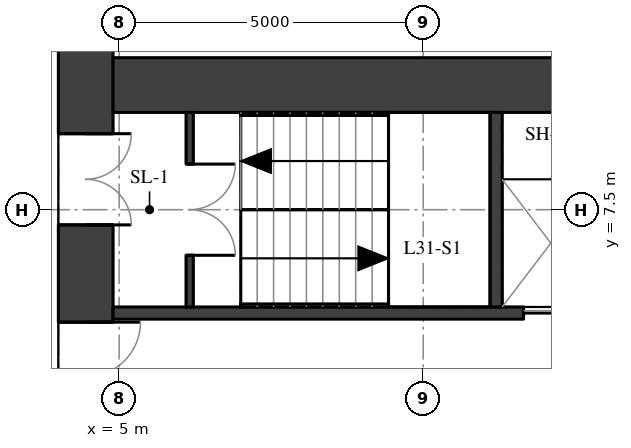
"""IFC4 building model, lengths in metres.
Left out: names, types, materials, properties, quantities, classifications, styles, units other than length and angle.
Written with IfcOpenShell. Run it as: python <this file> out.ifc"""

import sys

from ifc_helpers import new_model, si_unit, direction, frame, frame_2d, origin, place, context, subcontext, project, spatial, rectangle, extrude, element, fill, save


model = new_model("IFC4")
c1 = context("Model", 3, precision=1e-05, world=origin(), true_north=direction((0.0, 1.0)))
c2 = subcontext(c1, "Body", "Model", "MODEL_VIEW")
j1 = project(units=[si_unit("LENGTHUNIT", "METRE"), si_unit("PLANEANGLEUNIT", "RADIAN")], contexts=[c1])
p1 = place(None, origin())
s1 = spatial("IfcSite", under=j1, at=p1, CompositionType="ELEMENT")
p2 = place(p1, origin())
s2 = spatial("IfcBuilding", under=s1, at=p2, CompositionType="ELEMENT")
p3 = place(p2, frame((0.0, 0.0, 112.0)))
s3 = spatial("IfcBuildingStorey", under=s2, at=p3, CompositionType="ELEMENT", Elevation=112.0)
p4 = place(p3, frame((4.45, -11.1, 0.0), z_axis=(0.0, 0.0, 1.0), x_axis=(0.0, 1.0, 0.0)))
e1 = element("IfcWall", 1, at=p4, inside=s3, PredefinedType="SHEAR", context=c2, shape_type="SweptSolid", body=[
    extrude(rectangle(XDim=22.2, YDim=0.9, at=frame_2d((11.1, 0.0))), origin(), (0.0, 0.0, 1.0), 3.02),
])
p5 = place(p4, frame((2.35, 0.0, 0.0)))
e2 = element("IfcOpeningElement", 2, at=p5, cuts=e1, PredefinedType="OPENING", context=c2, shape_type="SweptSolid", body=[
    extrude(rectangle(XDim=1.5, YDim=2.1, at=frame_2d((0.75, 1.05))), frame((0.0, 0.46, 0.0), z_axis=(0.0, -1.0, 0.0), x_axis=(1.0, 0.0, 0.0)), (0.0, 0.0, 1.0), 0.92),
])
p6 = place(p4, frame((5.45, 0.0, 0.0)))
e3 = element("IfcOpeningElement", 3, at=p6, cuts=e1, PredefinedType="OPENING", context=c2, shape_type="SweptSolid", body=[
    extrude(rectangle(XDim=1.8, YDim=2.1, at=frame_2d((0.9, 1.05))), frame((0.0, 0.46, 0.0), z_axis=(0.0, -1.0, 0.0), x_axis=(1.0, 0.0, 0.0)), (0.0, 0.0, 1.0), 0.92),
])
p7 = place(p4, frame((7.95, 0.0, 0.0)))
e4 = element("IfcOpeningElement", 4, at=p7, cuts=e1, PredefinedType="OPENING", context=c2, shape_type="SweptSolid", body=[
    extrude(rectangle(XDim=1.1, YDim=2.1, at=frame_2d((0.55, 1.05))), frame((0.0, 0.46, 0.0), z_axis=(0.0, -1.0, 0.0), x_axis=(1.0, 0.0, 0.0)), (0.0, 0.0, 1.0), 0.92),
])
p8 = place(p4, frame((10.6, 0.0, 0.0)))
e5 = element("IfcOpeningElement", 5, at=p8, cuts=e1, PredefinedType="OPENING", context=c2, shape_type="SweptSolid", body=[
    extrude(rectangle(XDim=1.0, YDim=2.1, at=frame_2d((0.5, 1.05))), frame((0.0, 0.46, 0.0), z_axis=(0.0, -1.0, 0.0), x_axis=(1.0, 0.0, 0.0)), (0.0, 0.0, 1.0), 0.92),
])
p9 = place(p4, frame((13.15, 0.0, 0.0)))
e6 = element("IfcOpeningElement", 6, at=p9, cuts=e1, PredefinedType="OPENING", context=c2, shape_type="SweptSolid", body=[
    extrude(rectangle(XDim=1.1, YDim=2.1, at=frame_2d((0.55, 1.05))), frame((0.0, 0.46, 0.0), z_axis=(0.0, -1.0, 0.0), x_axis=(1.0, 0.0, 0.0)), (0.0, 0.0, 1.0), 0.92),
])
p10 = place(p4, frame((14.95, 0.0, 0.0)))
e7 = element("IfcOpeningElement", 7, at=p10, cuts=e1, PredefinedType="OPENING", context=c2, shape_type="SweptSolid", body=[
    extrude(rectangle(XDim=1.8, YDim=2.1, at=frame_2d((0.9, 1.05))), frame((0.0, 0.46, 0.0), z_axis=(0.0, -1.0, 0.0), x_axis=(1.0, 0.0, 0.0)), (0.0, 0.0, 1.0), 0.92),
])
p11 = place(p4, frame((18.35, 0.0, 0.0)))
e8 = element("IfcOpeningElement", 8, at=p11, cuts=e1, PredefinedType="OPENING", context=c2, shape_type="SweptSolid", body=[
    extrude(rectangle(XDim=1.5, YDim=2.1, at=frame_2d((0.75, 1.05))), frame((0.0, 0.46, 0.0), z_axis=(0.0, -1.0, 0.0), x_axis=(1.0, 0.0, 0.0)), (0.0, 0.0, 1.0), 0.92),
])
p12 = place(p3, frame((4.9, 9.55, 0.0), z_axis=(0.0, 0.0, 1.0), x_axis=(1.0, 0.0, 0.0)))
e9 = element("IfcWall", 9, at=p12, inside=s3, PredefinedType="SHEAR", context=c2, shape_type="SweptSolid", body=[
    extrude(rectangle(XDim=10.2, YDim=0.9, at=frame_2d((5.1, 0.0))), origin(), (0.0, 0.0, 1.0), 3.02),
])
p13 = place(p3, frame((4.9, 5.8, 0.0), z_axis=(0.0, 0.0, 1.0), x_axis=(1.0, 0.0, 0.0)))
e10 = element("IfcWall", 10, at=p13, inside=s3, PredefinedType="SHEAR", context=c2, shape_type="SweptSolid", body=[
    extrude(rectangle(XDim=10.2, YDim=0.2, at=frame_2d((5.1, 0.0))), origin(), (0.0, 0.0, 1.0), 3.02),
])
p14 = place(p13, frame((6.75, 0.0, 0.0)))
e11 = element("IfcOpeningElement", 11, at=p14, cuts=e10, PredefinedType="OPENING", context=c2, shape_type="SweptSolid", body=[
    extrude(rectangle(XDim=1.1, YDim=2.1, at=frame_2d((0.55, 1.05))), frame((0.0, 0.11, 0.0), z_axis=(0.0, -1.0, 0.0), x_axis=(1.0, 0.0, 0.0)), (0.0, 0.0, 1.0), 0.22),
])
p15 = place(p13, frame((8.75, 0.0, 0.0)))
e12 = element("IfcOpeningElement", 12, at=p15, cuts=e10, PredefinedType="OPENING", context=c2, shape_type="SweptSolid", body=[
    extrude(rectangle(XDim=1.1, YDim=2.1, at=frame_2d((0.55, 1.05))), frame((0.0, 0.11, 0.0), z_axis=(0.0, -1.0, 0.0), x_axis=(1.0, 0.0, 0.0)), (0.0, 0.0, 1.0), 0.22),
])
p16 = place(p3, frame((11.2, 5.9, 0.0), z_axis=(0.0, 0.0, 1.0), x_axis=(0.0, 1.0, 0.0)))
e13 = element("IfcWall", 13, at=p16, inside=s3, PredefinedType="SHEAR", context=c2, shape_type="SweptSolid", body=[
    extrude(rectangle(XDim=3.2, YDim=0.2, at=frame_2d((1.6, 0.0))), origin(), (0.0, 0.0, 1.0), 3.02),
])
p17 = place(p3, frame((6.16, 5.9, 0.0), z_axis=(0.0, 0.0, 1.0), x_axis=(0.0, 1.0, 0.0)))
e14 = element("IfcWall", 14, at=p17, inside=s3, PredefinedType="SHEAR", context=c2, shape_type="SweptSolid", body=[
    extrude(rectangle(XDim=3.2, YDim=0.12, at=frame_2d((1.6, 0.0))), origin(), (0.0, 0.0, 1.0), 3.02),
])
p18 = place(p17, frame((0.85, 0.0, 0.0)))
e15 = element("IfcOpeningElement", 15, at=p18, cuts=e14, PredefinedType="OPENING", context=c2, shape_type="SweptSolid", body=[
    extrude(rectangle(XDim=1.5, YDim=2.1, at=frame_2d((0.75, 1.05))), frame((0.0, 0.07, 0.0), z_axis=(0.0, -1.0, 0.0), x_axis=(1.0, 0.0, 0.0)), (0.0, 0.0, 1.0), 0.14),
])
p19 = place(p10, origin())
e16 = element("IfcDoor", 16, at=p19, inside=s3, OperationType="DOUBLE_DOOR_SINGLE_SWING", PredefinedType="DOOR", context=c2, shape_type="SweptSolid", body=[
    extrude(rectangle(XDim=1.8, YDim=2.1, at=frame_2d((0.9, 1.05))), frame((0.0, 0.025, 0.0), z_axis=(0.0, -1.0, 0.0), x_axis=(1.0, 0.0, 0.0)), (0.0, 0.0, 1.0), 0.05),
])
fill(e7, e16)
p20 = place(p11, origin())
e17 = element("IfcDoor", 17, at=p20, inside=s3, OperationType="DOUBLE_DOOR_SINGLE_SWING", PredefinedType="DOOR", context=c2, shape_type="SweptSolid", body=[
    extrude(rectangle(XDim=1.5, YDim=2.1, at=frame_2d((0.75, 1.05))), frame((0.0, 0.025, 0.0), z_axis=(0.0, -1.0, 0.0), x_axis=(1.0, 0.0, 0.0)), (0.0, 0.0, 1.0), 0.05),
])
fill(e8, e17)
p21 = place(p18, origin())
e18 = element("IfcDoor", 18, at=p21, inside=s3, OperationType="DOUBLE_DOOR_SINGLE_SWING", PredefinedType="DOOR", context=c2, shape_type="SweptSolid", body=[
    extrude(rectangle(XDim=1.5, YDim=2.1, at=frame_2d((0.75, 1.05))), frame((0.0, 0.025, 0.0), z_axis=(0.0, -1.0, 0.0), x_axis=(1.0, 0.0, 0.0)), (0.0, 0.0, 1.0), 0.05),
])
fill(e15, e18)
p22 = place(p14, origin())
e19 = element("IfcDoor", 19, at=p22, inside=s3, OperationType="DOUBLE_DOOR_SLIDING", PredefinedType="DOOR", context=c2, shape_type="SweptSolid", body=[
    extrude(rectangle(XDim=1.1, YDim=2.1, at=frame_2d((0.55, 1.05))), frame((0.0, 0.025, 0.0), z_axis=(0.0, -1.0, 0.0), x_axis=(1.0, 0.0, 0.0)), (0.0, 0.0, 1.0), 0.05),
])
fill(e11, e19)
save(model, sys.argv[1])
